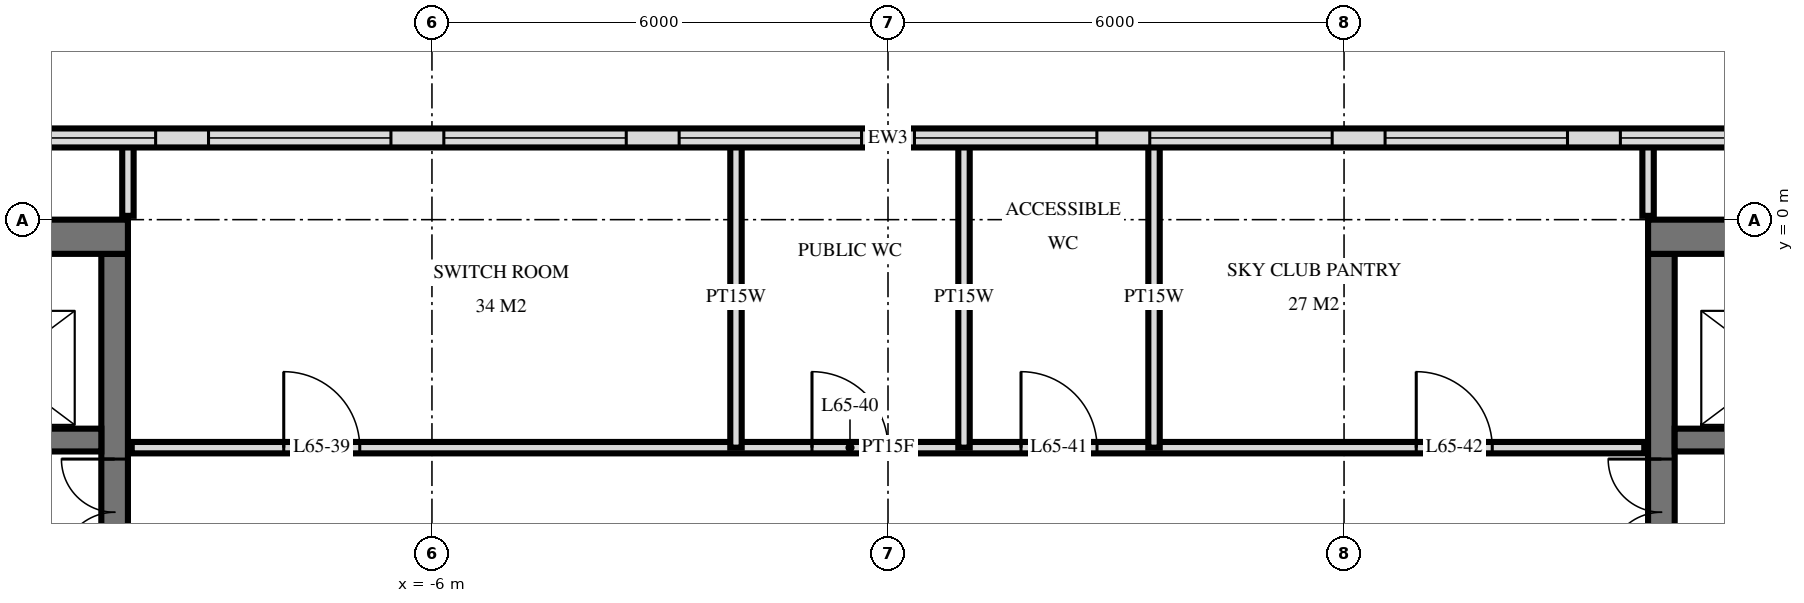
"""IFC4 building model, lengths in metres.
Left out: names, types, materials, properties, quantities, classifications, styles, units other than length and angle.
Written with IfcOpenShell. Run it as: python <this file> out.ifc"""

import sys

from ifc_helpers import new_model, si_unit, direction, frame, frame_2d, origin, place, context, subcontext, project, spatial, rectangle, extrude, element, fill, save


model = new_model("IFC4")
c1 = context("Model", 3, precision=1e-05, world=origin(), true_north=direction((0.0, 1.0)))
c2 = subcontext(c1, "Body", "Model", "MODEL_VIEW")
j1 = project(units=[si_unit("LENGTHUNIT", "METRE"), si_unit("PLANEANGLEUNIT", "RADIAN")], contexts=[c1])
p1 = place(None, origin())
s1 = spatial("IfcSite", under=j1, at=p1, CompositionType="ELEMENT")
p2 = place(p1, origin())
s2 = spatial("IfcBuilding", under=s1, at=p2, CompositionType="ELEMENT")
p3 = place(p2, frame((0.0, 0.0, 246.6)))
s3 = spatial("IfcBuildingStorey", under=s2, at=p3, CompositionType="ELEMENT", Elevation=246.6)
p4 = place(p3, frame((-19.5, -0.225, 0.0), z_axis=(0.0, 0.0, 1.0), x_axis=(1.0, 0.0, 0.0)))
e1 = element("IfcWall", 1, at=p4, inside=s3, PredefinedType="SHEAR", context=c2, shape_type="SweptSolid", body=[
    extrude(rectangle(XDim=9.5, YDim=0.45, at=frame_2d((4.75, 0.0))), origin(), (0.0, 0.0, 1.0), 6.0),
])
p5 = place(p3, frame((-10.175, -14.55, 0.0), z_axis=(0.0, 0.0, 1.0), x_axis=(0.0, 1.0, 0.0)))
e2 = element("IfcWall", 2, at=p5, inside=s3, PredefinedType="SHEAR", context=c2, shape_type="SweptSolid", body=[
    extrude(rectangle(XDim=14.1, YDim=0.35, at=frame_2d((7.05, 0.0))), origin(), (0.0, 0.0, 1.0), 6.0),
])
p6 = place(p5, frame((8.4, 0.0, 0.0)))
e3 = element("IfcOpeningElement", 3, at=p6, cuts=e2, PredefinedType="OPENING", context=c2, shape_type="SweptSolid", body=[
    extrude(rectangle(XDim=1.4, YDim=2.4, at=frame_2d((0.7, 1.2))), frame((0.0, 0.185, 0.0), z_axis=(0.0, -1.0, 0.0), x_axis=(1.0, 0.0, 0.0)), (0.0, 0.0, 1.0), 0.37),
])
p7 = place(p5, frame((10.0, 0.0, 0.0)))
e4 = element("IfcOpeningElement", 4, at=p7, cuts=e2, PredefinedType="OPENING", context=c2, shape_type="SweptSolid", body=[
    extrude(rectangle(XDim=1.4, YDim=2.4, at=frame_2d((0.7, 1.2))), frame((0.0, 0.185, 0.0), z_axis=(0.0, -1.0, 0.0), x_axis=(1.0, 0.0, 0.0)), (0.0, 0.0, 1.0), 0.37),
])
p8 = place(p5, frame((4.0, 0.0, 0.0)))
e5 = element("IfcOpeningElement", 5, at=p8, cuts=e2, PredefinedType="OPENING", context=c2, shape_type="SweptSolid", body=[
    extrude(rectangle(XDim=1.2, YDim=2.1, at=frame_2d((0.6, 1.05))), frame((0.0, 0.185, 0.0), z_axis=(0.0, -1.0, 0.0), x_axis=(1.0, 0.0, 0.0)), (0.0, 0.0, 1.0), 0.37),
])
p9 = place(p3, frame((-19.05, -2.9, 0.0), z_axis=(0.0, 0.0, 1.0), x_axis=(1.0, 0.0, 0.0)))
e6 = element("IfcWall", 6, at=p9, inside=s3, PredefinedType="SHEAR", context=c2, shape_type="SweptSolid", body=[
    extrude(rectangle(XDim=8.7, YDim=0.3, at=frame_2d((4.35, 0.0))), origin(), (0.0, 0.0, 1.0), 6.0),
])
p10 = place(p9, frame((6.8, 0.0, 0.0)))
e7 = element("IfcOpeningElement", 7, at=p10, cuts=e6, PredefinedType="OPENING", context=c2, shape_type="SweptSolid", body=[
    extrude(rectangle(XDim=1.1, YDim=2.1, at=frame_2d((0.55, 1.05))), frame((0.0, 0.16, 0.0), z_axis=(0.0, -1.0, 0.0), x_axis=(1.0, 0.0, 0.0)), (0.0, 0.0, 1.0), 0.32),
])
p11 = place(p9, frame((3.8, 0.0, 0.0)))
e8 = element("IfcOpeningElement", 8, at=p11, cuts=e6, PredefinedType="OPENING", context=c2, shape_type="SweptSolid", body=[
    extrude(rectangle(XDim=1.1, YDim=2.1, at=frame_2d((0.55, 1.05))), frame((0.0, 0.16, 0.0), z_axis=(0.0, -1.0, 0.0), x_axis=(1.0, 0.0, 0.0)), (0.0, 0.0, 1.0), 0.32),
])
p12 = place(p9, frame((1.613, 0.0, 0.0)))
e9 = element("IfcOpeningElement", 9, at=p12, cuts=e6, PredefinedType="OPENING", context=c2, shape_type="SweptSolid", body=[
    extrude(rectangle(XDim=0.9, YDim=2.1, at=frame_2d((0.45, 1.05))), frame((0.0, 0.16, 0.0), z_axis=(0.0, -1.0, 0.0), x_axis=(1.0, 0.0, 0.0)), (0.0, 0.0, 1.0), 0.32),
])
p13 = place(p9, frame((0.188, 0.0, 0.0)))
e10 = element("IfcOpeningElement", 10, at=p13, cuts=e6, PredefinedType="OPENING", context=c2, shape_type="SweptSolid", body=[
    extrude(rectangle(XDim=0.9, YDim=2.1, at=frame_2d((0.45, 1.05))), frame((0.0, 0.16, 0.0), z_axis=(0.0, -1.0, 0.0), x_axis=(1.0, 0.0, 0.0)), (0.0, 0.0, 1.0), 0.32),
])
p14 = place(p3, frame((10.0, -0.225, 0.0), z_axis=(0.0, 0.0, 1.0), x_axis=(1.0, 0.0, 0.0)))
e11 = element("IfcWall", 11, at=p14, inside=s3, PredefinedType="SHEAR", context=c2, shape_type="SweptSolid", body=[
    extrude(rectangle(XDim=9.5, YDim=0.45, at=frame_2d((4.75, 0.0))), origin(), (0.0, 0.0, 1.0), 6.0),
])
p15 = place(p3, frame((10.175, -14.55, 0.0), z_axis=(0.0, 0.0, 1.0), x_axis=(0.0, 1.0, 0.0)))
e12 = element("IfcWall", 12, at=p15, inside=s3, PredefinedType="SHEAR", context=c2, shape_type="SweptSolid", body=[
    extrude(rectangle(XDim=14.1, YDim=0.35, at=frame_2d((7.05, 0.0))), origin(), (0.0, 0.0, 1.0), 6.0),
])
p16 = place(p15, frame((8.4, 0.0, 0.0)))
e13 = element("IfcOpeningElement", 13, at=p16, cuts=e12, PredefinedType="OPENING", context=c2, shape_type="SweptSolid", body=[
    extrude(rectangle(XDim=1.4, YDim=2.4, at=frame_2d((0.7, 1.2))), frame((0.0, 0.185, 0.0), z_axis=(0.0, -1.0, 0.0), x_axis=(1.0, 0.0, 0.0)), (0.0, 0.0, 1.0), 0.37),
])
p17 = place(p15, frame((10.0, 0.0, 0.0)))
e14 = element("IfcOpeningElement", 14, at=p17, cuts=e12, PredefinedType="OPENING", context=c2, shape_type="SweptSolid", body=[
    extrude(rectangle(XDim=1.4, YDim=2.4, at=frame_2d((0.7, 1.2))), frame((0.0, 0.185, 0.0), z_axis=(0.0, -1.0, 0.0), x_axis=(1.0, 0.0, 0.0)), (0.0, 0.0, 1.0), 0.37),
])
p18 = place(p15, frame((4.0, 0.0, 0.0)))
e15 = element("IfcOpeningElement", 15, at=p18, cuts=e12, PredefinedType="OPENING", context=c2, shape_type="SweptSolid", body=[
    extrude(rectangle(XDim=1.2, YDim=2.1, at=frame_2d((0.6, 1.05))), frame((0.0, 0.185, 0.0), z_axis=(0.0, -1.0, 0.0), x_axis=(1.0, 0.0, 0.0)), (0.0, 0.0, 1.0), 0.37),
])
p19 = place(p3, frame((10.35, -2.9, 0.0), z_axis=(0.0, 0.0, 1.0), x_axis=(1.0, 0.0, 0.0)))
e16 = element("IfcWall", 16, at=p19, inside=s3, PredefinedType="SHEAR", context=c2, shape_type="SweptSolid", body=[
    extrude(rectangle(XDim=8.7, YDim=0.3, at=frame_2d((4.35, 0.0))), origin(), (0.0, 0.0, 1.0), 6.0),
])
p20 = place(p19, frame((0.8, 0.0, 0.0)))
e17 = element("IfcOpeningElement", 17, at=p20, cuts=e16, PredefinedType="OPENING", context=c2, shape_type="SweptSolid", body=[
    extrude(rectangle(XDim=1.1, YDim=2.1, at=frame_2d((0.55, 1.05))), frame((0.0, 0.16, 0.0), z_axis=(0.0, -1.0, 0.0), x_axis=(1.0, 0.0, 0.0)), (0.0, 0.0, 1.0), 0.32),
])
p21 = place(p19, frame((3.8, 0.0, 0.0)))
e18 = element("IfcOpeningElement", 18, at=p21, cuts=e16, PredefinedType="OPENING", context=c2, shape_type="SweptSolid", body=[
    extrude(rectangle(XDim=1.1, YDim=2.1, at=frame_2d((0.55, 1.05))), frame((0.0, 0.16, 0.0), z_axis=(0.0, -1.0, 0.0), x_axis=(1.0, 0.0, 0.0)), (0.0, 0.0, 1.0), 0.32),
])
p22 = place(p19, frame((6.188, 0.0, 0.0)))
e19 = element("IfcOpeningElement", 19, at=p22, cuts=e16, PredefinedType="OPENING", context=c2, shape_type="SweptSolid", body=[
    extrude(rectangle(XDim=0.9, YDim=2.1, at=frame_2d((0.45, 1.05))), frame((0.0, 0.16, 0.0), z_axis=(0.0, -1.0, 0.0), x_axis=(1.0, 0.0, 0.0)), (0.0, 0.0, 1.0), 0.32),
])
p23 = place(p19, frame((7.613, 0.0, 0.0)))
e20 = element("IfcOpeningElement", 20, at=p23, cuts=e16, PredefinedType="OPENING", context=c2, shape_type="SweptSolid", body=[
    extrude(rectangle(XDim=0.9, YDim=2.1, at=frame_2d((0.45, 1.05))), frame((0.0, 0.16, 0.0), z_axis=(0.0, -1.0, 0.0), x_axis=(1.0, 0.0, 0.0)), (0.0, 0.0, 1.0), 0.32),
])
p24 = place(p3, frame((18.575, 1.075, 0.0), z_axis=(0.0, 0.0, 1.0), x_axis=(-1.0, 0.0, 0.0)))
e21 = element("IfcWall", 21, at=p24, inside=s3, PredefinedType="SOLIDWALL", context=c2, shape_type="SweptSolid", body=[
    extrude(rectangle(XDim=37.151, YDim=0.25, at=frame_2d((18.575, 0.0))), origin(), (0.0, 0.0, 1.0), 5.72),
])
p25 = place(p24, frame((0.348, 0.0, 0.858)))
e22 = element("IfcOpeningElement", 22, at=p25, cuts=e21, PredefinedType="OPENING", context=c2, shape_type="SweptSolid", body=[
    extrude(rectangle(XDim=2.4, YDim=3.6, at=frame_2d((1.2, 1.8))), frame((0.0, 0.135, 0.0), z_axis=(0.0, -1.0, 0.0), x_axis=(1.0, 0.0, 0.0)), (0.0, 0.0, 1.0), 0.27),
])
p26 = place(p24, frame((3.444, 0.0, 0.858)))
e23 = element("IfcOpeningElement", 23, at=p26, cuts=e21, PredefinedType="OPENING", context=c2, shape_type="SweptSolid", body=[
    extrude(rectangle(XDim=2.4, YDim=3.6, at=frame_2d((1.2, 1.8))), frame((0.0, 0.135, 0.0), z_axis=(0.0, -1.0, 0.0), x_axis=(1.0, 0.0, 0.0)), (0.0, 0.0, 1.0), 0.27),
])
p27 = place(p24, frame((6.54, 0.0, 0.858)))
e24 = element("IfcOpeningElement", 24, at=p27, cuts=e21, PredefinedType="OPENING", context=c2, shape_type="SweptSolid", body=[
    extrude(rectangle(XDim=2.4, YDim=3.6, at=frame_2d((1.2, 1.8))), frame((0.0, 0.135, 0.0), z_axis=(0.0, -1.0, 0.0), x_axis=(1.0, 0.0, 0.0)), (0.0, 0.0, 1.0), 0.27),
])
p28 = place(p24, frame((9.635, 0.0, 0.858)))
e25 = element("IfcOpeningElement", 25, at=p28, cuts=e21, PredefinedType="OPENING", context=c2, shape_type="SweptSolid", body=[
    extrude(rectangle(XDim=2.4, YDim=3.6, at=frame_2d((1.2, 1.8))), frame((0.0, 0.135, 0.0), z_axis=(0.0, -1.0, 0.0), x_axis=(1.0, 0.0, 0.0)), (0.0, 0.0, 1.0), 0.27),
])
p29 = place(p24, frame((12.731, 0.0, 0.858)))
e26 = element("IfcOpeningElement", 26, at=p29, cuts=e21, PredefinedType="OPENING", context=c2, shape_type="SweptSolid", body=[
    extrude(rectangle(XDim=2.4, YDim=3.6, at=frame_2d((1.2, 1.8))), frame((0.0, 0.135, 0.0), z_axis=(0.0, -1.0, 0.0), x_axis=(1.0, 0.0, 0.0)), (0.0, 0.0, 1.0), 0.27),
])
p30 = place(p24, frame((15.827, 0.0, 0.858)))
e27 = element("IfcOpeningElement", 27, at=p30, cuts=e21, PredefinedType="OPENING", context=c2, shape_type="SweptSolid", body=[
    extrude(rectangle(XDim=2.4, YDim=3.6, at=frame_2d((1.2, 1.8))), frame((0.0, 0.135, 0.0), z_axis=(0.0, -1.0, 0.0), x_axis=(1.0, 0.0, 0.0)), (0.0, 0.0, 1.0), 0.27),
])
p31 = place(p24, frame((18.923, 0.0, 0.858)))
e28 = element("IfcOpeningElement", 28, at=p31, cuts=e21, PredefinedType="OPENING", context=c2, shape_type="SweptSolid", body=[
    extrude(rectangle(XDim=2.4, YDim=3.6, at=frame_2d((1.2, 1.8))), frame((0.0, 0.135, 0.0), z_axis=(0.0, -1.0, 0.0), x_axis=(1.0, 0.0, 0.0)), (0.0, 0.0, 1.0), 0.27),
])
p32 = place(p24, frame((22.019, 0.0, 0.858)))
e29 = element("IfcOpeningElement", 29, at=p32, cuts=e21, PredefinedType="OPENING", context=c2, shape_type="SweptSolid", body=[
    extrude(rectangle(XDim=2.4, YDim=3.6, at=frame_2d((1.2, 1.8))), frame((0.0, 0.135, 0.0), z_axis=(0.0, -1.0, 0.0), x_axis=(1.0, 0.0, 0.0)), (0.0, 0.0, 1.0), 0.27),
])
p33 = place(p24, frame((25.115, 0.0, 0.858)))
e30 = element("IfcOpeningElement", 30, at=p33, cuts=e21, PredefinedType="OPENING", context=c2, shape_type="SweptSolid", body=[
    extrude(rectangle(XDim=2.4, YDim=3.6, at=frame_2d((1.2, 1.8))), frame((0.0, 0.135, 0.0), z_axis=(0.0, -1.0, 0.0), x_axis=(1.0, 0.0, 0.0)), (0.0, 0.0, 1.0), 0.27),
])
p34 = place(p24, frame((28.211, 0.0, 0.858)))
e31 = element("IfcOpeningElement", 31, at=p34, cuts=e21, PredefinedType="OPENING", context=c2, shape_type="SweptSolid", body=[
    extrude(rectangle(XDim=2.4, YDim=3.6, at=frame_2d((1.2, 1.8))), frame((0.0, 0.135, 0.0), z_axis=(0.0, -1.0, 0.0), x_axis=(1.0, 0.0, 0.0)), (0.0, 0.0, 1.0), 0.27),
])
p35 = place(p24, frame((31.307, 0.0, 0.858)))
e32 = element("IfcOpeningElement", 32, at=p35, cuts=e21, PredefinedType="OPENING", context=c2, shape_type="SweptSolid", body=[
    extrude(rectangle(XDim=2.4, YDim=3.6, at=frame_2d((1.2, 1.8))), frame((0.0, 0.135, 0.0), z_axis=(0.0, -1.0, 0.0), x_axis=(1.0, 0.0, 0.0)), (0.0, 0.0, 1.0), 0.27),
])
p36 = place(p24, frame((34.403, 0.0, 0.858)))
e33 = element("IfcOpeningElement", 33, at=p36, cuts=e21, PredefinedType="OPENING", context=c2, shape_type="SweptSolid", body=[
    extrude(rectangle(XDim=2.4, YDim=3.6, at=frame_2d((1.2, 1.8))), frame((0.0, 0.135, 0.0), z_axis=(0.0, -1.0, 0.0), x_axis=(1.0, 0.0, 0.0)), (0.0, 0.0, 1.0), 0.27),
])
p37 = place(p3, frame((10.0, 0.05, 0.0), z_axis=(0.0, 0.0, 1.0), x_axis=(0.0, 1.0, 0.0)))
e34 = element("IfcWall", 34, at=p37, inside=s3, PredefinedType="PARTITIONING", context=c2, shape_type="SweptSolid", body=[
    extrude(rectangle(XDim=0.91, YDim=0.15, at=frame_2d((0.455, 0.0))), origin(), (0.0, 0.0, 1.0), 5.7),
])
for number, where, z_axis, x_axis in (
    (35, (3.5, -3.0, 0.0), (0.0, 0.0, 1.0), (0.0, 1.0, 0.0)),
    (36, (1.0, -3.0, 0.0), (0.0, 0.0, 1.0), (0.0, 1.0, 0.0)),
    (37, (-2.0, -3.0, 0.0), (0.0, 0.0, 1.0), (0.0, 1.0, 0.0)),
):
    element("IfcWall", number, at=place(p3, frame(where, z_axis=z_axis, x_axis=x_axis)), inside=s3, PredefinedType="PLUMBINGWALL", context=c2, shape_type="SweptSolid", body=[
        extrude(rectangle(XDim=3.96, YDim=0.15, at=frame_2d((1.98, 0.0))), origin(), (0.0, 0.0, 1.0), 5.7),
    ])
p38 = place(p3, frame((-10.0, 0.05, 0.0), z_axis=(0.0, 0.0, 1.0), x_axis=(0.0, 1.0, 0.0)))
e38 = element("IfcWall", 38, at=p38, inside=s3, PredefinedType="PARTITIONING", context=c2, shape_type="SweptSolid", body=[
    extrude(rectangle(XDim=0.91, YDim=0.15, at=frame_2d((0.455, 0.0))), origin(), (0.0, 0.0, 1.0), 5.7),
])
p39 = place(p3, frame((-9.95, -3.0, 0.0), z_axis=(0.0, 0.0, 1.0), x_axis=(1.0, 0.0, 0.0)))
e39 = element("IfcWall", 39, at=p39, inside=s3, PredefinedType="PARTITIONING", context=c2, shape_type="SweptSolid", body=[
    extrude(rectangle(XDim=19.9, YDim=0.15, at=frame_2d((9.95, 0.0))), origin(), (0.0, 0.0, 1.0), 5.7),
])
p40 = place(p39, frame((2.0, 0.0, 0.0)))
e40 = element("IfcOpeningElement", 40, at=p40, cuts=e39, PredefinedType="OPENING", context=c2, shape_type="SweptSolid", body=[
    extrude(rectangle(XDim=1.0, YDim=2.1, at=frame_2d((0.5, 1.05))), frame((0.0, 0.085, 0.0), z_axis=(0.0, -1.0, 0.0), x_axis=(1.0, 0.0, 0.0)), (0.0, 0.0, 1.0), 0.17),
])
p41 = place(p39, frame((8.95, 0.0, 0.0)))
e41 = element("IfcOpeningElement", 41, at=p41, cuts=e39, PredefinedType="OPENING", context=c2, shape_type="SweptSolid", body=[
    extrude(rectangle(XDim=1.0, YDim=2.1, at=frame_2d((0.5, 1.05))), frame((0.0, 0.085, 0.0), z_axis=(0.0, -1.0, 0.0), x_axis=(1.0, 0.0, 0.0)), (0.0, 0.0, 1.0), 0.17),
])
p42 = place(p39, frame((11.7, 0.0, 0.0)))
e42 = element("IfcOpeningElement", 42, at=p42, cuts=e39, PredefinedType="OPENING", context=c2, shape_type="SweptSolid", body=[
    extrude(rectangle(XDim=1.0, YDim=2.1, at=frame_2d((0.5, 1.05))), frame((0.0, 0.085, 0.0), z_axis=(0.0, -1.0, 0.0), x_axis=(1.0, 0.0, 0.0)), (0.0, 0.0, 1.0), 0.17),
])
p43 = place(p39, frame((16.9, 0.0, 0.0)))
e43 = element("IfcOpeningElement", 43, at=p43, cuts=e39, PredefinedType="OPENING", context=c2, shape_type="SweptSolid", body=[
    extrude(rectangle(XDim=1.0, YDim=2.1, at=frame_2d((0.5, 1.05))), frame((0.0, 0.085, 0.0), z_axis=(0.0, -1.0, 0.0), x_axis=(1.0, 0.0, 0.0)), (0.0, 0.0, 1.0), 0.17),
])
p44 = place(p27, origin())
e44 = element("IfcWindow", 44, at=p44, inside=s3, PartitioningType="SINGLE_PANEL", PredefinedType="USERDEFINED", context=c2, shape_type="SweptSolid", body=[
    extrude(rectangle(XDim=2.4, YDim=3.6, at=frame_2d((1.2, 1.8))), frame((0.0, 0.03, 0.0), z_axis=(0.0, -1.0, 0.0), x_axis=(1.0, 0.0, 0.0)), (0.0, 0.0, 1.0), 0.06),
])
fill(e24, e44)
p45 = place(p28, origin())
e45 = element("IfcWindow", 45, at=p45, inside=s3, PartitioningType="SINGLE_PANEL", PredefinedType="USERDEFINED", context=c2, shape_type="SweptSolid", body=[
    extrude(rectangle(XDim=2.4, YDim=3.6, at=frame_2d((1.2, 1.8))), frame((0.0, 0.03, 0.0), z_axis=(0.0, -1.0, 0.0), x_axis=(1.0, 0.0, 0.0)), (0.0, 0.0, 1.0), 0.06),
])
fill(e25, e45)
p46 = place(p29, origin())
e46 = element("IfcWindow", 46, at=p46, inside=s3, PartitioningType="SINGLE_PANEL", PredefinedType="USERDEFINED", context=c2, shape_type="SweptSolid", body=[
    extrude(rectangle(XDim=2.4, YDim=3.6, at=frame_2d((1.2, 1.8))), frame((0.0, 0.03, 0.0), z_axis=(0.0, -1.0, 0.0), x_axis=(1.0, 0.0, 0.0)), (0.0, 0.0, 1.0), 0.06),
])
fill(e26, e46)
p47 = place(p30, origin())
e47 = element("IfcWindow", 47, at=p47, inside=s3, PartitioningType="SINGLE_PANEL", PredefinedType="USERDEFINED", context=c2, shape_type="SweptSolid", body=[
    extrude(rectangle(XDim=2.4, YDim=3.6, at=frame_2d((1.2, 1.8))), frame((0.0, 0.03, 0.0), z_axis=(0.0, -1.0, 0.0), x_axis=(1.0, 0.0, 0.0)), (0.0, 0.0, 1.0), 0.06),
])
fill(e27, e47)
p48 = place(p31, origin())
e48 = element("IfcWindow", 48, at=p48, inside=s3, PartitioningType="SINGLE_PANEL", PredefinedType="USERDEFINED", context=c2, shape_type="SweptSolid", body=[
    extrude(rectangle(XDim=2.4, YDim=3.6, at=frame_2d((1.2, 1.8))), frame((0.0, 0.03, 0.0), z_axis=(0.0, -1.0, 0.0), x_axis=(1.0, 0.0, 0.0)), (0.0, 0.0, 1.0), 0.06),
])
fill(e28, e48)
p49 = place(p32, origin())
e49 = element("IfcWindow", 49, at=p49, inside=s3, PartitioningType="SINGLE_PANEL", PredefinedType="USERDEFINED", context=c2, shape_type="SweptSolid", body=[
    extrude(rectangle(XDim=2.4, YDim=3.6, at=frame_2d((1.2, 1.8))), frame((0.0, 0.03, 0.0), z_axis=(0.0, -1.0, 0.0), x_axis=(1.0, 0.0, 0.0)), (0.0, 0.0, 1.0), 0.06),
])
fill(e29, e49)
p50 = place(p33, origin())
e50 = element("IfcWindow", 50, at=p50, inside=s3, PartitioningType="SINGLE_PANEL", PredefinedType="USERDEFINED", context=c2, shape_type="SweptSolid", body=[
    extrude(rectangle(XDim=2.4, YDim=3.6, at=frame_2d((1.2, 1.8))), frame((0.0, 0.03, 0.0), z_axis=(0.0, -1.0, 0.0), x_axis=(1.0, 0.0, 0.0)), (0.0, 0.0, 1.0), 0.06),
])
fill(e30, e50)
p51 = place(p34, origin())
e51 = element("IfcWindow", 51, at=p51, inside=s3, PartitioningType="SINGLE_PANEL", PredefinedType="USERDEFINED", context=c2, shape_type="SweptSolid", body=[
    extrude(rectangle(XDim=2.4, YDim=3.6, at=frame_2d((1.2, 1.8))), frame((0.0, 0.03, 0.0), z_axis=(0.0, -1.0, 0.0), x_axis=(1.0, 0.0, 0.0)), (0.0, 0.0, 1.0), 0.06),
])
fill(e31, e51)
p52 = place(p7, origin())
e52 = element("IfcDoor", 52, at=p52, inside=s3, OperationType="DOUBLE_DOOR_SINGLE_SWING", PredefinedType="DOOR", context=c2, shape_type="SweptSolid", body=[
    extrude(rectangle(XDim=1.4, YDim=2.4, at=frame_2d((0.7, 1.2))), frame((0.0, 0.025, 0.0), z_axis=(0.0, -1.0, 0.0), x_axis=(1.0, 0.0, 0.0)), (0.0, 0.0, 1.0), 0.05),
])
fill(e4, e52)
p53 = place(p17, origin())
e53 = element("IfcDoor", 53, at=p53, inside=s3, OperationType="DOUBLE_DOOR_SINGLE_SWING", PredefinedType="DOOR", context=c2, shape_type="SweptSolid", body=[
    extrude(rectangle(XDim=1.4, YDim=2.4, at=frame_2d((0.7, 1.2))), frame((0.0, 0.025, 0.0), z_axis=(0.0, -1.0, 0.0), x_axis=(1.0, 0.0, 0.0)), (0.0, 0.0, 1.0), 0.05),
])
fill(e14, e53)
p54 = place(p40, origin())
e54 = element("IfcDoor", 54, at=p54, inside=s3, OperationType="SINGLE_SWING_RIGHT", PredefinedType="DOOR", context=c2, shape_type="SweptSolid", body=[
    extrude(rectangle(XDim=1.0, YDim=2.1, at=frame_2d((0.5, 1.05))), frame((0.0, 0.025, 0.0), z_axis=(0.0, -1.0, 0.0), x_axis=(1.0, 0.0, 0.0)), (0.0, 0.0, 1.0), 0.05),
])
fill(e40, e54)
p55 = place(p41, origin())
e55 = element("IfcDoor", 55, at=p55, inside=s3, OperationType="SINGLE_SWING_RIGHT", PredefinedType="DOOR", context=c2, shape_type="SweptSolid", body=[
    extrude(rectangle(XDim=1.0, YDim=2.1, at=frame_2d((0.5, 1.05))), frame((0.0, 0.025, 0.0), z_axis=(0.0, -1.0, 0.0), x_axis=(1.0, 0.0, 0.0)), (0.0, 0.0, 1.0), 0.05),
])
fill(e41, e55)
p56 = place(p42, origin())
e56 = element("IfcDoor", 56, at=p56, inside=s3, OperationType="SINGLE_SWING_RIGHT", PredefinedType="DOOR", context=c2, shape_type="SweptSolid", body=[
    extrude(rectangle(XDim=1.0, YDim=2.1, at=frame_2d((0.5, 1.05))), frame((0.0, 0.025, 0.0), z_axis=(0.0, -1.0, 0.0), x_axis=(1.0, 0.0, 0.0)), (0.0, 0.0, 1.0), 0.05),
])
fill(e42, e56)
p57 = place(p43, origin())
e57 = element("IfcDoor", 57, at=p57, inside=s3, OperationType="SINGLE_SWING_RIGHT", PredefinedType="DOOR", context=c2, shape_type="SweptSolid", body=[
    extrude(rectangle(XDim=1.0, YDim=2.1, at=frame_2d((0.5, 1.05))), frame((0.0, 0.025, 0.0), z_axis=(0.0, -1.0, 0.0), x_axis=(1.0, 0.0, 0.0)), (0.0, 0.0, 1.0), 0.05),
])
fill(e43, e57)
save(model, sys.argv[1])
